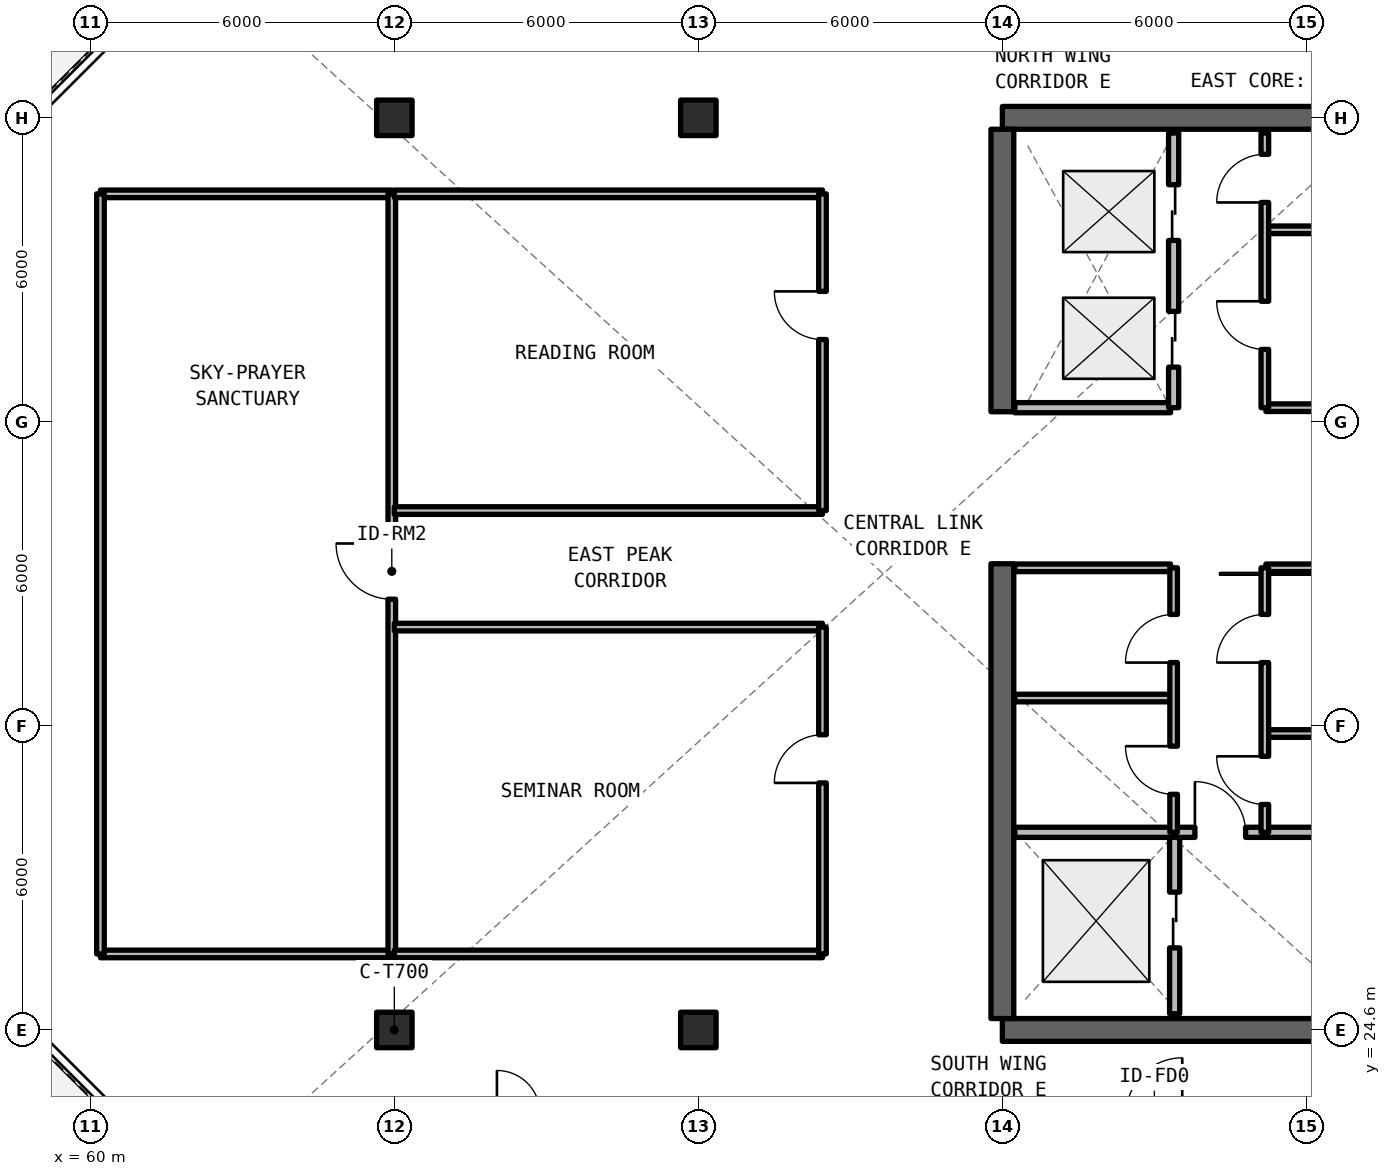
"""IFC4 building model, lengths in metres.
Left out: names, types, materials, properties, quantities, classifications, styles, units other than length and angle.
Written with IfcOpenShell. Run it as: python <this file> out.ifc"""

import sys

from ifc_helpers import new_model, si_unit, direction, frame, frame_2d, origin, origin_2d, place, context, subcontext, project, spatial, rectangle, extrude, element, fill, save


model = new_model("IFC4")
c1 = context("Model", 3, precision=1e-05, world=origin(), true_north=direction((0.0, 1.0)))
c2 = subcontext(c1, "Body", "Model", "MODEL_VIEW")
j1 = project(units=[si_unit("LENGTHUNIT", "METRE"), si_unit("PLANEANGLEUNIT", "RADIAN")], contexts=[c1])
p1 = place(None, origin())
s1 = spatial("IfcSite", under=j1, at=p1, CompositionType="ELEMENT")
p2 = place(p1, origin())
s2 = spatial("IfcBuilding", under=s1, at=p2, CompositionType="ELEMENT")
p3 = place(p2, frame((0.0, 0.0, 229.35)))
s3 = spatial("IfcBuildingStorey", under=s2, at=p3, CompositionType="ELEMENT", Elevation=229.35)
for number, where, z_axis, x_axis in (
    (1, (78.0, 24.6, 0.0), (0.0, 0.0, 1.0), (1.0, 0.0, 0.0)),
    (2, (90.0, 42.6, 0.0), (0.0, 0.0, 1.0), (-1.0, 0.0, 0.0)),
):
    element("IfcWall", number, at=place(p3, frame(where, z_axis=z_axis, x_axis=x_axis)), inside=s3, PredefinedType="SHEAR", context=c2, shape_type="SweptSolid", body=[
        extrude(rectangle(XDim=12.0, YDim=0.45, at=frame_2d((6.0, 0.0))), origin(), (0.0, 0.0, 1.0), 3.3),
    ])
p4 = place(p3, frame((78.0, 24.825, 0.0), z_axis=(0.0, 0.0, 1.0), x_axis=(0.0, 1.0, 0.0)))
e3 = element("IfcWall", 3, at=p4, inside=s3, PredefinedType="SHEAR", context=c2, shape_type="SweptSolid", body=[
    extrude(rectangle(XDim=8.975, YDim=0.45, at=frame_2d((4.488, 0.0))), origin(), (0.0, 0.0, 1.0), 3.3),
])
p5 = place(p3, frame((78.0, 36.8, 0.0), z_axis=(0.0, 0.0, 1.0), x_axis=(0.0, 1.0, 0.0)))
e4 = element("IfcWall", 4, at=p5, inside=s3, PredefinedType="SHEAR", context=c2, shape_type="SweptSolid", body=[
    extrude(rectangle(XDim=5.575, YDim=0.45, at=frame_2d((2.788, 0.0))), origin(), (0.0, 0.0, 1.0), 3.3),
])
for number, where, z_axis, x_axis in (
    (5, (66.0, 24.6, 0.0), (0.0, 0.0, 1.0), (1.0, 0.0, 0.0)),
    (6, (66.0, 42.6, 0.0), (0.0, 0.0, 1.0), (1.0, 0.0, 0.0)),
    (7, (72.0, 24.6, 0.0), (0.0, 0.0, 1.0), (1.0, 0.0, 0.0)),
    (8, (72.0, 42.6, 0.0), (0.0, 0.0, 1.0), (1.0, 0.0, 0.0)),
):
    element("IfcColumn", number, at=place(p3, frame(where, z_axis=z_axis, x_axis=x_axis)), inside=s3, PredefinedType="COLUMN", context=c2, shape_type="SweptSolid", body=[
        extrude(rectangle(XDim=0.7, YDim=0.7, at=origin_2d()), origin(), (0.0, 0.0, 1.0), 3.3),
    ])
p6 = place(p3, frame((81.4, 24.92, 0.0), z_axis=(0.0, 0.0, 1.0), x_axis=(0.0, 1.0, 0.0)))
e9 = element("IfcWall", 9, at=p6, inside=s3, PredefinedType="SOLIDWALL", context=c2, shape_type="SweptSolid", body=[
    extrude(rectangle(XDim=3.58, YDim=0.2, at=frame_2d((1.79, 0.0))), origin(), (0.0, 0.0, 1.0), 2.35),
])
p7 = place(p6, frame((1.3, 0.0, 0.0)))
e10 = element("IfcOpeningElement", 10, at=p7, cuts=e9, PredefinedType="OPENING", context=c2, shape_type="SweptSolid", body=[
    extrude(rectangle(XDim=1.1, YDim=2.2, at=frame_2d((0.55, 1.1))), frame((0.0, 0.11, 0.0), z_axis=(0.0, -1.0, 0.0), x_axis=(1.0, 0.0, 0.0)), (0.0, 0.0, 1.0), 0.22),
])
p8 = place(p3, frame((78.245, 28.5, 0.0), z_axis=(0.0, 0.0, 1.0), x_axis=(1.0, 0.0, 0.0)))
e11 = element("IfcWall", 11, at=p8, inside=s3, PredefinedType="SOLIDWALL", context=c2, shape_type="SweptSolid", body=[
    extrude(rectangle(XDim=7.585, YDim=0.2, at=frame_2d((3.792, 0.0))), origin(), (0.0, 0.0, 1.0), 2.35),
])
p9 = place(p8, frame((3.555, 0.0, 0.0)))
e12 = element("IfcOpeningElement", 12, at=p9, cuts=e11, PredefinedType="OPENING", context=c2, shape_type="SweptSolid", body=[
    extrude(rectangle(XDim=1.0, YDim=2.15, at=frame_2d((0.5, 1.075))), frame((0.0, 0.11, 0.0), z_axis=(0.0, -1.0, 0.0), x_axis=(1.0, 0.0, 0.0)), (0.0, 0.0, 1.0), 0.22),
])
for number, where, z_axis, x_axis in (
    (13, (83.2, 30.45, 0.0), (0.0, 0.0, 1.0), (1.0, 0.0, 0.0)),
    (14, (83.2, 33.72, 0.0), (0.0, 0.0, 1.0), (1.0, 0.0, 0.0)),
):
    element("IfcWall", number, at=place(p3, frame(where, z_axis=z_axis, x_axis=x_axis)), inside=s3, PredefinedType="SOLIDWALL", context=c2, shape_type="SweptSolid", body=[
        extrude(rectangle(XDim=2.63, YDim=0.15, at=frame_2d((1.315, 0.0))), origin(), (0.0, 0.0, 1.0), 2.35),
    ])
p10 = place(p3, frame((83.18, 28.5, 0.0), z_axis=(0.0, 0.0, 1.0), x_axis=(0.0, 1.0, 0.0)))
e15 = element("IfcWall", 15, at=p10, inside=s3, PredefinedType="SOLIDWALL", context=c2, shape_type="SweptSolid", body=[
    extrude(rectangle(XDim=5.22, YDim=0.15, at=frame_2d((2.61, 0.0))), origin(), (0.0, 0.0, 1.0), 2.35),
])
p11 = place(p10, frame((0.55, 0.0, 0.0)))
e16 = element("IfcOpeningElement", 16, at=p11, cuts=e15, PredefinedType="OPENING", context=c2, shape_type="SweptSolid", body=[
    extrude(rectangle(XDim=0.95, YDim=2.15, at=frame_2d((0.475, 1.075))), frame((0.0, 0.085, 0.0), z_axis=(0.0, -1.0, 0.0), x_axis=(1.0, 0.0, 0.0)), (0.0, 0.0, 1.0), 0.17),
])
p12 = place(p10, frame((3.35, 0.0, 0.0)))
e17 = element("IfcOpeningElement", 17, at=p12, cuts=e15, PredefinedType="OPENING", context=c2, shape_type="SweptSolid", body=[
    extrude(rectangle(XDim=0.95, YDim=2.15, at=frame_2d((0.475, 1.075))), frame((0.0, 0.085, 0.0), z_axis=(0.0, -1.0, 0.0), x_axis=(1.0, 0.0, 0.0)), (0.0, 0.0, 1.0), 0.17),
])
for number, where, z_axis, x_axis in (
    (18, (78.245, 31.15, 0.0), (0.0, 0.0, 1.0), (1.0, 0.0, 0.0)),
    (19, (78.245, 33.72, 0.0), (0.0, 0.0, 1.0), (1.0, 0.0, 0.0)),
):
    element("IfcWall", number, at=place(p3, frame(where, z_axis=z_axis, x_axis=x_axis)), inside=s3, PredefinedType="SOLIDWALL", context=c2, shape_type="SweptSolid", body=[
        extrude(rectangle(XDim=3.075, YDim=0.15, at=frame_2d((1.538, 0.0))), origin(), (0.0, 0.0, 1.0), 2.35),
    ])
p13 = place(p3, frame((81.38, 28.5, 0.0), z_axis=(0.0, 0.0, 1.0), x_axis=(0.0, 1.0, 0.0)))
e20 = element("IfcWall", 20, at=p13, inside=s3, PredefinedType="SOLIDWALL", context=c2, shape_type="SweptSolid", body=[
    extrude(rectangle(XDim=5.22, YDim=0.15, at=frame_2d((2.61, 0.0))), origin(), (0.0, 0.0, 1.0), 2.35),
])
p14 = place(p13, frame((0.75, 0.0, 0.0)))
e21 = element("IfcOpeningElement", 21, at=p14, cuts=e20, PredefinedType="OPENING", context=c2, shape_type="SweptSolid", body=[
    extrude(rectangle(XDim=0.95, YDim=2.15, at=frame_2d((0.475, 1.075))), frame((0.0, 0.085, 0.0), z_axis=(0.0, -1.0, 0.0), x_axis=(1.0, 0.0, 0.0)), (0.0, 0.0, 1.0), 0.17),
])
p15 = place(p13, frame((3.35, 0.0, 0.0)))
e22 = element("IfcOpeningElement", 22, at=p15, cuts=e20, PredefinedType="OPENING", context=c2, shape_type="SweptSolid", body=[
    extrude(rectangle(XDim=0.95, YDim=2.15, at=frame_2d((0.475, 1.075))), frame((0.0, 0.085, 0.0), z_axis=(0.0, -1.0, 0.0), x_axis=(1.0, 0.0, 0.0)), (0.0, 0.0, 1.0), 0.17),
])
for number, where, z_axis, x_axis in (
    (23, (83.2, 36.88, 0.0), (0.0, 0.0, 1.0), (1.0, 0.0, 0.0)),
    (24, (83.2, 40.39, 0.0), (0.0, 0.0, 1.0), (1.0, 0.0, 0.0)),
):
    element("IfcWall", number, at=place(p3, frame(where, z_axis=z_axis, x_axis=x_axis)), inside=s3, PredefinedType="SOLIDWALL", context=c2, shape_type="SweptSolid", body=[
        extrude(rectangle(XDim=2.63, YDim=0.15, at=frame_2d((1.315, 0.0))), origin(), (0.0, 0.0, 1.0), 2.35),
    ])
p16 = place(p3, frame((83.18, 36.88, 0.0), z_axis=(0.0, 0.0, 1.0), x_axis=(0.0, 1.0, 0.0)))
e25 = element("IfcWall", 25, at=p16, inside=s3, PredefinedType="SOLIDWALL", context=c2, shape_type="SweptSolid", body=[
    extrude(rectangle(XDim=5.42, YDim=0.15, at=frame_2d((2.71, 0.0))), origin(), (0.0, 0.0, 1.0), 2.35),
])
p17 = place(p16, frame((1.15, 0.0, 0.0)))
e26 = element("IfcOpeningElement", 26, at=p17, cuts=e25, PredefinedType="OPENING", context=c2, shape_type="SweptSolid", body=[
    extrude(rectangle(XDim=0.95, YDim=2.15, at=frame_2d((0.475, 1.075))), frame((0.0, 0.085, 0.0), z_axis=(0.0, -1.0, 0.0), x_axis=(1.0, 0.0, 0.0)), (0.0, 0.0, 1.0), 0.17),
])
p18 = place(p16, frame((4.05, 0.0, 0.0)))
e27 = element("IfcOpeningElement", 27, at=p18, cuts=e25, PredefinedType="OPENING", context=c2, shape_type="SweptSolid", body=[
    extrude(rectangle(XDim=0.95, YDim=2.15, at=frame_2d((0.475, 1.075))), frame((0.0, 0.085, 0.0), z_axis=(0.0, -1.0, 0.0), x_axis=(1.0, 0.0, 0.0)), (0.0, 0.0, 1.0), 0.17),
])
p19 = place(p3, frame((78.245, 36.88, 0.0), z_axis=(0.0, 0.0, 1.0), x_axis=(1.0, 0.0, 0.0)))
e28 = element("IfcWall", 28, at=p19, inside=s3, PredefinedType="SOLIDWALL", context=c2, shape_type="SweptSolid", body=[
    extrude(rectangle(XDim=3.075, YDim=0.2, at=frame_2d((1.538, 0.0))), origin(), (0.0, 0.0, 1.0), 2.35),
])
p20 = place(p3, frame((81.38, 36.88, 0.0), z_axis=(0.0, 0.0, 1.0), x_axis=(0.0, 1.0, 0.0)))
e29 = element("IfcWall", 29, at=p20, inside=s3, PredefinedType="SOLIDWALL", context=c2, shape_type="SweptSolid", body=[
    extrude(rectangle(XDim=5.42, YDim=0.2, at=frame_2d((2.71, 0.0))), origin(), (0.0, 0.0, 1.0), 2.35),
])
p21 = place(p20, frame((0.8, 0.0, 0.0)))
e30 = element("IfcOpeningElement", 30, at=p21, cuts=e29, PredefinedType="OPENING", context=c2, shape_type="SweptSolid", body=[
    extrude(rectangle(XDim=1.1, YDim=2.2, at=frame_2d((0.55, 1.1))), frame((0.0, 0.11, 0.0), z_axis=(0.0, -1.0, 0.0), x_axis=(1.0, 0.0, 0.0)), (0.0, 0.0, 1.0), 0.22),
])
p22 = place(p20, frame((3.3, 0.0, 0.0)))
e31 = element("IfcOpeningElement", 31, at=p22, cuts=e29, PredefinedType="OPENING", context=c2, shape_type="SweptSolid", body=[
    extrude(rectangle(XDim=1.1, YDim=2.2, at=frame_2d((0.55, 1.1))), frame((0.0, 0.11, 0.0), z_axis=(0.0, -1.0, 0.0), x_axis=(1.0, 0.0, 0.0)), (0.0, 0.0, 1.0), 0.22),
])
for number, where, z_axis, x_axis in (
    (32, (60.2, 26.1, 0.0), (0.0, 0.0, 1.0), (1.0, 0.0, 0.0)),
    (33, (60.2, 41.1, 0.0), (0.0, 0.0, 1.0), (1.0, 0.0, 0.0)),
):
    element("IfcWall", number, at=place(p3, frame(where, z_axis=z_axis, x_axis=x_axis)), inside=s3, PredefinedType="SOLIDWALL", context=c2, shape_type="SweptSolid", body=[
        extrude(rectangle(XDim=5.75, YDim=0.15, at=frame_2d((2.875, 0.0))), origin(), (0.0, 0.0, 1.0), 2.35),
    ])
p23 = place(p3, frame((60.2, 26.1, 0.0), z_axis=(0.0, 0.0, 1.0), x_axis=(0.0, 1.0, 0.0)))
e34 = element("IfcWall", 34, at=p23, inside=s3, PredefinedType="SOLIDWALL", context=c2, shape_type="SweptSolid", body=[
    extrude(rectangle(XDim=15.0, YDim=0.15, at=frame_2d((7.5, 0.0))), origin(), (0.0, 0.0, 1.0), 2.35),
])
p24 = place(p3, frame((65.95, 26.1, 0.0), z_axis=(0.0, 0.0, 1.0), x_axis=(0.0, 1.0, 0.0)))
e35 = element("IfcWall", 35, at=p24, inside=s3, PredefinedType="SOLIDWALL", context=c2, shape_type="SweptSolid", body=[
    extrude(rectangle(XDim=15.0, YDim=0.15, at=frame_2d((7.5, 0.0))), origin(), (0.0, 0.0, 1.0), 2.35),
])
p25 = place(p24, frame((7.0, 0.0, 0.0)))
e36 = element("IfcOpeningElement", 36, at=p25, cuts=e35, PredefinedType="OPENING", context=c2, shape_type="SweptSolid", body=[
    extrude(rectangle(XDim=1.1, YDim=2.15, at=frame_2d((0.55, 1.075))), frame((0.0, 0.085, 0.0), z_axis=(0.0, -1.0, 0.0), x_axis=(1.0, 0.0, 0.0)), (0.0, 0.0, 1.0), 0.17),
])
for number, where, z_axis, x_axis in (
    (37, (66.0, 26.1, 0.0), (0.0, 0.0, 1.0), (1.0, 0.0, 0.0)),
    (38, (66.0, 32.55, 0.0), (0.0, 0.0, 1.0), (1.0, 0.0, 0.0)),
):
    element("IfcWall", number, at=place(p3, frame(where, z_axis=z_axis, x_axis=x_axis)), inside=s3, PredefinedType="SOLIDWALL", context=c2, shape_type="SweptSolid", body=[
        extrude(rectangle(XDim=8.45, YDim=0.15, at=frame_2d((4.225, 0.0))), origin(), (0.0, 0.0, 1.0), 2.35),
    ])
p26 = place(p3, frame((74.45, 26.1, 0.0), z_axis=(0.0, 0.0, 1.0), x_axis=(0.0, 1.0, 0.0)))
e39 = element("IfcWall", 39, at=p26, inside=s3, PredefinedType="SOLIDWALL", context=c2, shape_type="SweptSolid", body=[
    extrude(rectangle(XDim=6.45, YDim=0.15, at=frame_2d((3.225, 0.0))), origin(), (0.0, 0.0, 1.0), 2.35),
])
p27 = place(p26, frame((3.375, 0.0, 0.0)))
e40 = element("IfcOpeningElement", 40, at=p27, cuts=e39, PredefinedType="OPENING", context=c2, shape_type="SweptSolid", body=[
    extrude(rectangle(XDim=0.95, YDim=2.15, at=frame_2d((0.475, 1.075))), frame((0.0, 0.085, 0.0), z_axis=(0.0, -1.0, 0.0), x_axis=(1.0, 0.0, 0.0)), (0.0, 0.0, 1.0), 0.17),
])
for number, where, z_axis, x_axis in (
    (41, (66.0, 34.85, 0.0), (0.0, 0.0, 1.0), (1.0, 0.0, 0.0)),
    (42, (66.0, 41.1, 0.0), (0.0, 0.0, 1.0), (1.0, 0.0, 0.0)),
):
    element("IfcWall", number, at=place(p3, frame(where, z_axis=z_axis, x_axis=x_axis)), inside=s3, PredefinedType="SOLIDWALL", context=c2, shape_type="SweptSolid", body=[
        extrude(rectangle(XDim=8.45, YDim=0.15, at=frame_2d((4.225, 0.0))), origin(), (0.0, 0.0, 1.0), 2.35),
    ])
p28 = place(p3, frame((74.45, 34.85, 0.0), z_axis=(0.0, 0.0, 1.0), x_axis=(0.0, 1.0, 0.0)))
e43 = element("IfcWall", 43, at=p28, inside=s3, PredefinedType="SOLIDWALL", context=c2, shape_type="SweptSolid", body=[
    extrude(rectangle(XDim=6.25, YDim=0.15, at=frame_2d((3.125, 0.0))), origin(), (0.0, 0.0, 1.0), 2.35),
])
p29 = place(p28, frame((3.375, 0.0, 0.0)))
e44 = element("IfcOpeningElement", 44, at=p29, cuts=e43, PredefinedType="OPENING", context=c2, shape_type="SweptSolid", body=[
    extrude(rectangle(XDim=0.95, YDim=2.15, at=frame_2d((0.475, 1.075))), frame((0.0, 0.085, 0.0), z_axis=(0.0, -1.0, 0.0), x_axis=(1.0, 0.0, 0.0)), (0.0, 0.0, 1.0), 0.17),
])
p30 = place(p7, origin())
e45 = element("IfcDoor", 45, at=p30, inside=s3, OperationType="SLIDING_TO_LEFT", PredefinedType="DOOR", context=c2, shape_type="SweptSolid", body=[
    extrude(rectangle(XDim=1.1, YDim=2.2, at=frame_2d((0.55, 1.1))), frame((0.0, 0.025, 0.0), z_axis=(0.0, -1.0, 0.0), x_axis=(1.0, 0.0, 0.0)), (0.0, 0.0, 1.0), 0.05),
])
fill(e10, e45)
p31 = place(p9, origin())
e46 = element("IfcDoor", 46, at=p31, inside=s3, OperationType="SINGLE_SWING_LEFT", PredefinedType="DOOR", context=c2, shape_type="SweptSolid", body=[
    extrude(rectangle(XDim=1.0, YDim=2.15, at=frame_2d((0.5, 1.075))), frame((0.0, 0.025, 0.0), z_axis=(0.0, -1.0, 0.0), x_axis=(1.0, 0.0, 0.0)), (0.0, 0.0, 1.0), 0.05),
])
fill(e12, e46)
p32 = place(p11, origin())
e47 = element("IfcDoor", 47, at=p32, inside=s3, OperationType="SINGLE_SWING_RIGHT", PredefinedType="DOOR", context=c2, shape_type="SweptSolid", body=[
    extrude(rectangle(XDim=0.95, YDim=2.15, at=frame_2d((0.475, 1.075))), frame((0.0, 0.025, 0.0), z_axis=(0.0, -1.0, 0.0), x_axis=(1.0, 0.0, 0.0)), (0.0, 0.0, 1.0), 0.05),
])
fill(e16, e47)
p33 = place(p12, origin())
e48 = element("IfcDoor", 48, at=p33, inside=s3, OperationType="SINGLE_SWING_LEFT", PredefinedType="DOOR", context=c2, shape_type="SweptSolid", body=[
    extrude(rectangle(XDim=0.95, YDim=2.15, at=frame_2d((0.475, 1.075))), frame((0.0, 0.025, 0.0), z_axis=(0.0, -1.0, 0.0), x_axis=(1.0, 0.0, 0.0)), (0.0, 0.0, 1.0), 0.05),
])
fill(e17, e48)
p34 = place(p14, origin())
e49 = element("IfcDoor", 49, at=p34, inside=s3, OperationType="SINGLE_SWING_RIGHT", PredefinedType="DOOR", context=c2, shape_type="SweptSolid", body=[
    extrude(rectangle(XDim=0.95, YDim=2.15, at=frame_2d((0.475, 1.075))), frame((0.0, 0.025, 0.0), z_axis=(0.0, -1.0, 0.0), x_axis=(1.0, 0.0, 0.0)), (0.0, 0.0, 1.0), 0.05),
])
fill(e21, e49)
p35 = place(p15, origin())
e50 = element("IfcDoor", 50, at=p35, inside=s3, OperationType="SINGLE_SWING_LEFT", PredefinedType="DOOR", context=c2, shape_type="SweptSolid", body=[
    extrude(rectangle(XDim=0.95, YDim=2.15, at=frame_2d((0.475, 1.075))), frame((0.0, 0.025, 0.0), z_axis=(0.0, -1.0, 0.0), x_axis=(1.0, 0.0, 0.0)), (0.0, 0.0, 1.0), 0.05),
])
fill(e22, e50)
p36 = place(p17, origin())
e51 = element("IfcDoor", 51, at=p36, inside=s3, OperationType="SINGLE_SWING_RIGHT", PredefinedType="DOOR", context=c2, shape_type="SweptSolid", body=[
    extrude(rectangle(XDim=0.95, YDim=2.15, at=frame_2d((0.475, 1.075))), frame((0.0, 0.025, 0.0), z_axis=(0.0, -1.0, 0.0), x_axis=(1.0, 0.0, 0.0)), (0.0, 0.0, 1.0), 0.05),
])
fill(e26, e51)
p37 = place(p18, origin())
e52 = element("IfcDoor", 52, at=p37, inside=s3, OperationType="SINGLE_SWING_LEFT", PredefinedType="DOOR", context=c2, shape_type="SweptSolid", body=[
    extrude(rectangle(XDim=0.95, YDim=2.15, at=frame_2d((0.475, 1.075))), frame((0.0, 0.025, 0.0), z_axis=(0.0, -1.0, 0.0), x_axis=(1.0, 0.0, 0.0)), (0.0, 0.0, 1.0), 0.05),
])
fill(e27, e52)
p38 = place(p21, origin())
e53 = element("IfcDoor", 53, at=p38, inside=s3, OperationType="SLIDING_TO_LEFT", PredefinedType="DOOR", context=c2, shape_type="SweptSolid", body=[
    extrude(rectangle(XDim=1.1, YDim=2.2, at=frame_2d((0.55, 1.1))), frame((0.0, 0.025, 0.0), z_axis=(0.0, -1.0, 0.0), x_axis=(1.0, 0.0, 0.0)), (0.0, 0.0, 1.0), 0.05),
])
fill(e30, e53)
p39 = place(p22, origin())
e54 = element("IfcDoor", 54, at=p39, inside=s3, OperationType="SLIDING_TO_RIGHT", PredefinedType="DOOR", context=c2, shape_type="SweptSolid", body=[
    extrude(rectangle(XDim=1.1, YDim=2.2, at=frame_2d((0.55, 1.1))), frame((0.0, 0.025, 0.0), z_axis=(0.0, -1.0, 0.0), x_axis=(1.0, 0.0, 0.0)), (0.0, 0.0, 1.0), 0.05),
])
fill(e31, e54)
p40 = place(p25, origin())
e55 = element("IfcDoor", 55, at=p40, inside=s3, OperationType="SINGLE_SWING_RIGHT", PredefinedType="DOOR", context=c2, shape_type="SweptSolid", body=[
    extrude(rectangle(XDim=1.1, YDim=2.15, at=frame_2d((0.55, 1.075))), frame((0.0, 0.025, 0.0), z_axis=(0.0, -1.0, 0.0), x_axis=(1.0, 0.0, 0.0)), (0.0, 0.0, 1.0), 0.05),
])
fill(e36, e55)
p41 = place(p27, origin())
e56 = element("IfcDoor", 56, at=p41, inside=s3, OperationType="SINGLE_SWING_LEFT", PredefinedType="DOOR", context=c2, shape_type="SweptSolid", body=[
    extrude(rectangle(XDim=0.95, YDim=2.15, at=frame_2d((0.475, 1.075))), frame((0.0, 0.025, 0.0), z_axis=(0.0, -1.0, 0.0), x_axis=(1.0, 0.0, 0.0)), (0.0, 0.0, 1.0), 0.05),
])
fill(e40, e56)
p42 = place(p29, origin())
e57 = element("IfcDoor", 57, at=p42, inside=s3, OperationType="SINGLE_SWING_RIGHT", PredefinedType="DOOR", context=c2, shape_type="SweptSolid", body=[
    extrude(rectangle(XDim=0.95, YDim=2.15, at=frame_2d((0.475, 1.075))), frame((0.0, 0.025, 0.0), z_axis=(0.0, -1.0, 0.0), x_axis=(1.0, 0.0, 0.0)), (0.0, 0.0, 1.0), 0.05),
])
fill(e44, e57)
save(model, sys.argv[1])
